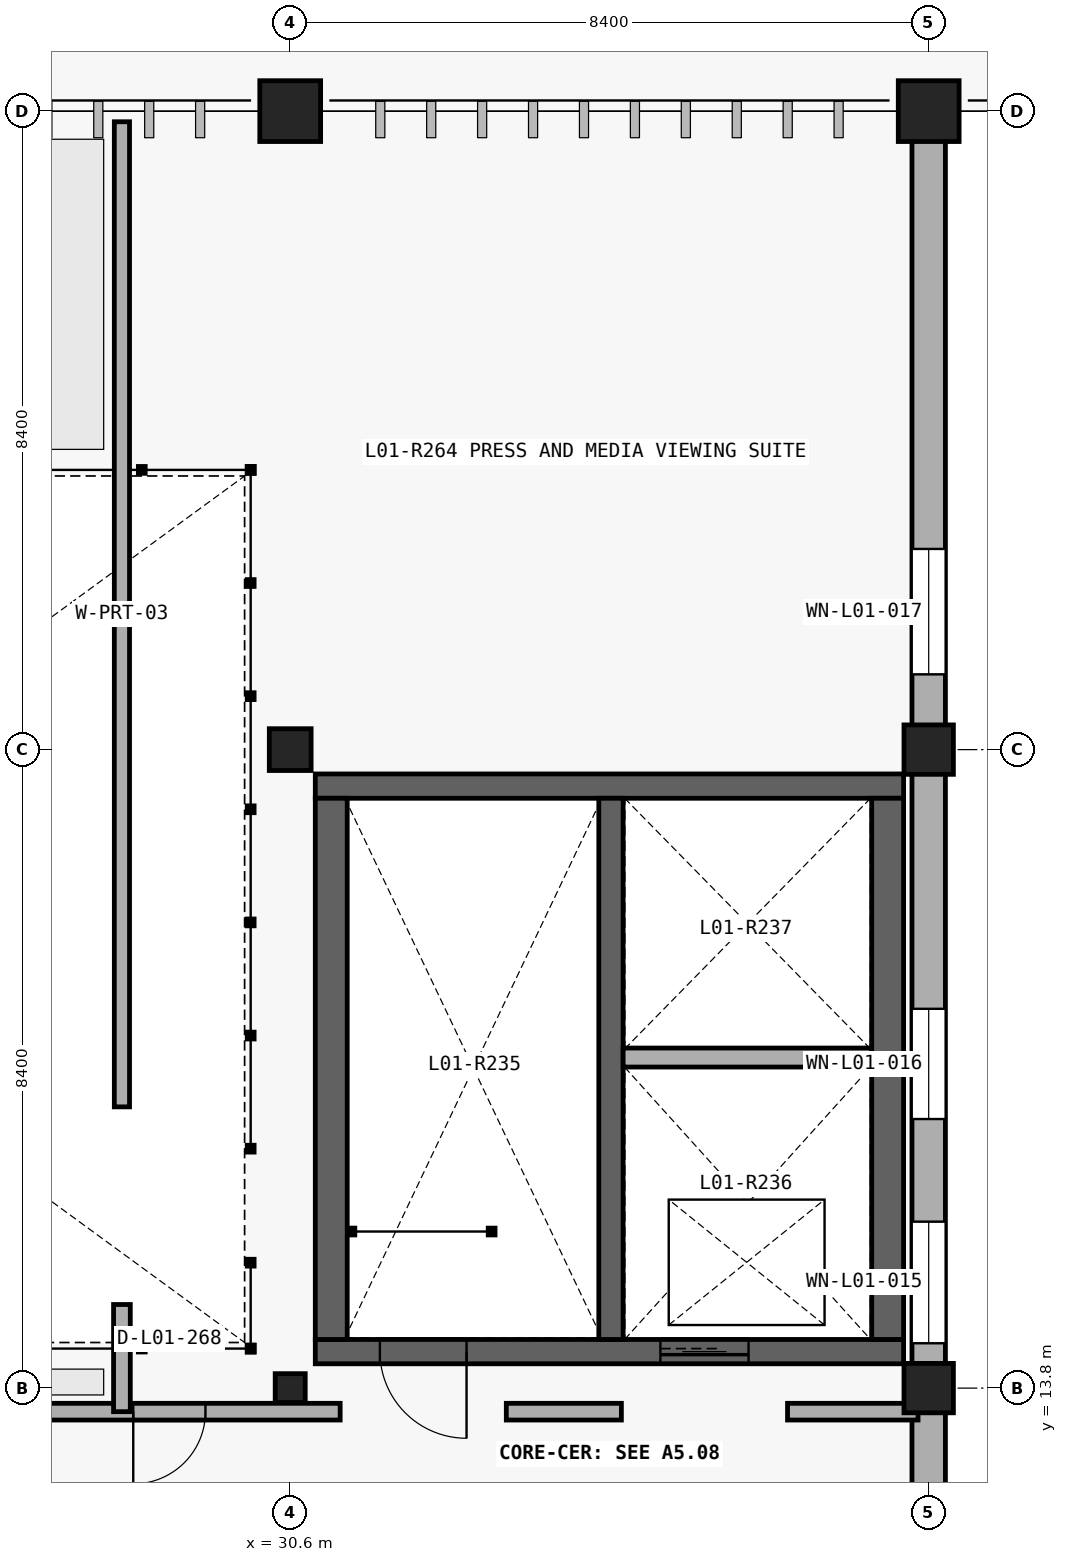
"""IFC4 building model, lengths in metres.
Left out: names, types, materials, properties, quantities, classifications, styles, units other than length and angle.
Written with IfcOpenShell. Run it as: python <this file> out.ifc"""

import sys

from ifc_helpers import new_model, si_unit, direction, frame, frame_2d, origin_with_axes, origin_2d_with_axis, place, context, subcontext, project, spatial, rectangle, circle, i_section, extrude, element, fill, save


model = new_model("IFC4")
c1 = context("Model", 3, precision=1e-05, world=origin_with_axes(), true_north=direction((0.0, 1.0)))
c2 = subcontext(c1, "Body", "Model", "MODEL_VIEW")
j1 = project(units=[si_unit("LENGTHUNIT", "METRE"), si_unit("PLANEANGLEUNIT", "RADIAN")], contexts=[c1])
p1 = place(None, origin_with_axes())
s1 = spatial("IfcSite", under=j1, at=p1, CompositionType="ELEMENT")
p2 = place(p1, origin_with_axes())
s2 = spatial("IfcBuilding", under=s1, at=p2, CompositionType="ELEMENT")
p3 = place(p2, frame((0.0, 0.0, 5.4), z_axis=(0.0, 0.0, 1.0), x_axis=(1.0, 0.0, 0.0)))
s3 = spatial("IfcBuildingStorey", under=s2, at=p3, CompositionType="ELEMENT", Elevation=5.4)
p4 = place(None, frame((39.0, 6.34, 5.4), z_axis=(0.0, 0.0, 1.0), x_axis=(0.0, 1.0, 0.0)))
e1 = element("IfcWall", 1, at=p4, inside=s3, PredefinedType="SOLIDWALL", context=c2, shape_type="SweptSolid", body=[
    extrude(rectangle(XDim=23.95, YDim=0.44, at=frame_2d((11.975, 0.0), x_axis=(1.0, 0.0))), origin_with_axes(), (0.0, 0.0, 1.0), 5.1),
])
p5 = place(None, frame((39.0, 9.015, 6.35), z_axis=(0.0, 0.0, 1.0), x_axis=(0.0, 1.0, 0.0)))
e2 = element("IfcOpeningElement", 2, at=p5, cuts=e1, PredefinedType="OPENING", context=c2, shape_type="SweptSolid", body=[
    extrude(rectangle(XDim=0.95, YDim=1.95, at=frame_2d((0.0, 0.975), x_axis=(1.0, 0.0))), frame((0.0, 0.23, 0.0), z_axis=(0.0, -1.0, 0.0), x_axis=(1.0, 0.0, 0.0)), (0.0, 0.0, 1.0), 0.46),
])
p6 = place(None, frame((39.0, 15.19, 6.25), z_axis=(0.0, 0.0, 1.0), x_axis=(0.0, 1.0, 0.0)))
e3 = element("IfcOpeningElement", 3, at=p6, cuts=e1, PredefinedType="OPENING", context=c2, shape_type="SweptSolid", body=[
    extrude(rectangle(XDim=1.6, YDim=3.1, at=frame_2d((0.0, 1.55), x_axis=(1.0, 0.0))), frame((0.0, 0.23, 0.0), z_axis=(0.0, -1.0, 0.0), x_axis=(1.0, 0.0, 0.0)), (0.0, 0.0, 1.0), 0.46),
])
p7 = place(None, frame((39.0, 18.065, 6.3), z_axis=(0.0, 0.0, 1.0), x_axis=(0.0, 1.0, 0.0)))
e4 = element("IfcOpeningElement", 4, at=p7, cuts=e1, PredefinedType="OPENING", context=c2, shape_type="SweptSolid", body=[
    extrude(rectangle(XDim=1.45, YDim=2.85, at=frame_2d((0.0, 1.425), x_axis=(1.0, 0.0))), frame((0.0, 0.23, 0.0), z_axis=(0.0, -1.0, 0.0), x_axis=(1.0, 0.0, 0.0)), (0.0, 0.0, 1.0), 0.46),
])
p8 = place(None, frame((39.0, 24.015, 6.3), z_axis=(0.0, 0.0, 1.0), x_axis=(0.0, 1.0, 0.0)))
e5 = element("IfcOpeningElement", 5, at=p8, cuts=e1, PredefinedType="OPENING", context=c2, shape_type="SweptSolid", body=[
    extrude(rectangle(XDim=1.65, YDim=2.4, at=frame_2d((0.0, 1.2), x_axis=(1.0, 0.0))), frame((0.0, 0.23, 0.0), z_axis=(0.0, -1.0, 0.0), x_axis=(1.0, 0.0, 0.0)), (0.0, 0.0, 1.0), 0.46),
])
p9 = place(None, frame((30.93, 14.28, 5.4), z_axis=(0.0, 0.0, 1.0), x_axis=(1.0, 0.0, 0.0)))
e6 = element("IfcWall", 6, at=p9, inside=s3, PredefinedType="SHEAR", context=c2, shape_type="SweptSolid", body=[
    extrude(rectangle(XDim=7.74, YDim=0.32, at=frame_2d((3.87, 0.0), x_axis=(1.0, 0.0))), origin_with_axes(), (0.0, 0.0, 1.0), 5.4),
])
p10 = place(None, frame((32.35, 14.28, 5.4), z_axis=(0.0, 0.0, 1.0), x_axis=(1.0, 0.0, 0.0)))
e7 = element("IfcOpeningElement", 7, at=p10, cuts=e6, PredefinedType="OPENING", context=c2, shape_type="SweptSolid", body=[
    extrude(rectangle(XDim=1.14, YDim=2.18, at=frame_2d((0.0, 1.09), x_axis=(1.0, 0.0))), frame((0.0, 0.17, 0.0), z_axis=(0.0, -1.0, 0.0), x_axis=(1.0, 0.0, 0.0)), (0.0, 0.0, 1.0), 0.34),
])
p11 = place(None, frame((36.05, 14.28, 5.4), z_axis=(0.0, 0.0, 1.0), x_axis=(1.0, 0.0, 0.0)))
e8 = element("IfcOpeningElement", 8, at=p11, cuts=e6, PredefinedType="OPENING", context=c2, shape_type="SweptSolid", body=[
    extrude(rectangle(XDim=1.16, YDim=2.2, at=frame_2d((0.0, 1.1), x_axis=(1.0, 0.0))), frame((0.0, 0.17, 0.0), z_axis=(0.0, -1.0, 0.0), x_axis=(1.0, 0.0, 0.0)), (0.0, 0.0, 1.0), 0.34),
])
p12 = place(None, frame((38.67, 21.72, 5.4), z_axis=(0.0, 0.0, 1.0), x_axis=(-1.0, 0.0, 0.0)))
e9 = element("IfcWall", 9, at=p12, inside=s3, PredefinedType="SHEAR", context=c2, shape_type="SweptSolid", body=[
    extrude(rectangle(XDim=7.74, YDim=0.32, at=frame_2d((3.87, 0.0), x_axis=(1.0, 0.0))), origin_with_axes(), (0.0, 0.0, 1.0), 5.4),
])
for number, where, z_axis, x_axis in (
    (10, (38.46, 14.44, 5.4), (0.0, 0.0, 1.0), (0.0, 1.0, 0.0)),
    (11, (31.14, 21.56, 5.4), (0.0, 0.0, 1.0), (0.0, -1.0, 0.0)),
):
    element("IfcWall", number, at=place(None, frame(where, z_axis=z_axis, x_axis=x_axis)), inside=s3, PredefinedType="SHEAR", context=c2, shape_type="SweptSolid", body=[
        extrude(rectangle(XDim=7.12, YDim=0.42, at=frame_2d((3.56, 0.0), x_axis=(1.0, 0.0))), origin_with_axes(), (0.0, 0.0, 1.0), 5.4),
    ])
p13 = place(None, frame((34.82, 14.44, 5.4), z_axis=(0.0, 0.0, 1.0), x_axis=(0.0, 1.0, 0.0)))
e12 = element("IfcWall", 12, at=p13, inside=s3, PredefinedType="SHEAR", context=c2, shape_type="SweptSolid", body=[
    extrude(rectangle(XDim=7.12, YDim=0.32, at=frame_2d((3.56, 0.0), x_axis=(1.0, 0.0))), origin_with_axes(), (0.0, 0.0, 1.0), 5.4),
])
p14 = place(None, frame((34.98, 18.149, 5.4), z_axis=(0.0, 0.0, 1.0), x_axis=(1.0, 0.0, 0.0)))
e13 = element("IfcWall", 13, at=p14, inside=s3, PredefinedType="PARTITIONING", context=c2, shape_type="SweptSolid", body=[
    extrude(rectangle(XDim=3.27, YDim=0.25, at=frame_2d((1.635, 0.0), x_axis=(1.0, 0.0))), origin_with_axes(), (0.0, 0.0, 1.0), 5.08),
])
p15 = place(None, frame((6.22, 13.49, 5.4), z_axis=(0.0, 0.0, 1.0), x_axis=(1.0, 0.0, 0.0)))
e14 = element("IfcWall", 14, at=p15, inside=s3, PredefinedType="PARTITIONING", context=c2, shape_type="SweptSolid", body=[
    extrude(rectangle(XDim=25.037, YDim=0.22, at=frame_2d((12.518, 0.0), x_axis=(1.0, 0.0))), origin_with_axes(), (0.0, 0.0, 1.0), 5.08),
])
p16 = place(None, frame((8.342, 13.49, 5.4), z_axis=(0.0, 0.0, 1.0), x_axis=(1.0, 0.0, 0.0)))
e15 = element("IfcOpeningElement", 15, at=p16, cuts=e14, PredefinedType="OPENING", context=c2, shape_type="SweptSolid", body=[
    extrude(rectangle(XDim=0.91, YDim=2.12, at=frame_2d((0.0, 1.06), x_axis=(1.0, 0.0))), frame((0.0, 0.12, 0.0), z_axis=(0.0, -1.0, 0.0), x_axis=(1.0, 0.0, 0.0)), (0.0, 0.0, 1.0), 0.24),
])
p17 = place(None, frame((18.963, 13.49, 5.4), z_axis=(0.0, 0.0, 1.0), x_axis=(1.0, 0.0, 0.0)))
e16 = element("IfcOpeningElement", 16, at=p17, cuts=e14, PredefinedType="OPENING", context=c2, shape_type="SweptSolid", body=[
    extrude(rectangle(XDim=1.56, YDim=2.28, at=frame_2d((0.0, 1.14), x_axis=(1.0, 0.0))), frame((0.0, 0.12, 0.0), z_axis=(0.0, -1.0, 0.0), x_axis=(1.0, 0.0, 0.0)), (0.0, 0.0, 1.0), 0.24),
])
p18 = place(None, frame((29.01, 13.49, 5.4), z_axis=(0.0, 0.0, 1.0), x_axis=(1.0, 0.0, 0.0)))
e17 = element("IfcOpeningElement", 17, at=p18, cuts=e14, PredefinedType="OPENING", context=c2, shape_type="SweptSolid", body=[
    extrude(rectangle(XDim=0.95, YDim=2.16, at=frame_2d((0.0, 1.08), x_axis=(1.0, 0.0))), frame((0.0, 0.12, 0.0), z_axis=(0.0, -1.0, 0.0), x_axis=(1.0, 0.0, 0.0)), (0.0, 0.0, 1.0), 0.24),
])
p19 = place(None, frame((23.833, 13.49, 6.45), z_axis=(0.0, 0.0, 1.0), x_axis=(1.0, 0.0, 0.0)))
e18 = element("IfcOpeningElement", 18, at=p19, cuts=e14, PredefinedType="OPENING", context=c2, shape_type="SweptSolid", body=[
    extrude(rectangle(XDim=1.9, YDim=1.5, at=frame_2d((0.0, 0.75), x_axis=(1.0, 0.0))), frame((0.0, 0.12, 0.0), z_axis=(0.0, -1.0, 0.0), x_axis=(1.0, 0.0, 0.0)), (0.0, 0.0, 1.0), 0.24),
])
p20 = place(None, frame((33.443, 13.49, 5.4), z_axis=(0.0, 0.0, 1.0), x_axis=(1.0, 0.0, 0.0)))
e19 = element("IfcWall", 19, at=p20, inside=s3, PredefinedType="PARTITIONING", context=c2, shape_type="SweptSolid", body=[
    extrude(rectangle(XDim=1.514, YDim=0.22, at=frame_2d((0.757, 0.0), x_axis=(1.0, 0.0))), origin_with_axes(), (0.0, 0.0, 1.0), 5.08),
])
p21 = place(None, frame((37.143, 13.49, 5.4), z_axis=(0.0, 0.0, 1.0), x_axis=(1.0, 0.0, 0.0)))
e20 = element("IfcWall", 20, at=p21, inside=s3, PredefinedType="PARTITIONING", context=c2, shape_type="SweptSolid", body=[
    extrude(rectangle(XDim=1.717, YDim=0.22, at=frame_2d((0.859, 0.0), x_axis=(1.0, 0.0))), origin_with_axes(), (0.0, 0.0, 1.0), 5.08),
])
p22 = place(None, frame((28.386, 13.49, 5.4), z_axis=(0.0, 0.0, 1.0), x_axis=(0.0, 1.0, 0.0)))
e21 = element("IfcWall", 21, at=p22, inside=s3, PredefinedType="PARTITIONING", context=c2, shape_type="SweptSolid", body=[
    extrude(rectangle(XDim=1.41, YDim=0.22, at=frame_2d((0.705, 0.0), x_axis=(1.0, 0.0))), origin_with_axes(), (0.0, 0.0, 1.0), 5.08),
])
p23 = place(None, frame((28.386, 17.5, 5.4), z_axis=(0.0, 0.0, 1.0), x_axis=(0.0, 1.0, 0.0)))
e22 = element("IfcWall", 22, at=p23, inside=s3, PredefinedType="PARTITIONING", context=c2, shape_type="SweptSolid", body=[
    extrude(rectangle(XDim=12.96, YDim=0.2, at=frame_2d((6.48, 0.0), x_axis=(1.0, 0.0))), origin_with_axes(), (0.0, 0.0, 1.0), 5.08),
])
p24 = place(None, frame((30.6, 13.8, 5.4), z_axis=(0.0, 0.0, 1.0), x_axis=(1.0, 0.0, 0.0)))
e23 = element("IfcColumn", 23, at=p24, inside=s3, PredefinedType="COLUMN", context=c2, shape_type="SweptSolid", body=[
    extrude(i_section(OverallWidth=0.395, OverallDepth=0.38, WebThickness=0.019, FlangeThickness=0.03, at=origin_2d_with_axis()), origin_with_axes(), (0.0, 0.0, 1.0), 5.4),
])
p25 = place(None, frame((30.6, 22.2, 5.4), z_axis=(0.0, 0.0, 1.0), x_axis=(1.0, 0.0, 0.0)))
e24 = element("IfcColumn", 24, at=p25, inside=s3, PredefinedType="COLUMN", context=c2, shape_type="SweptSolid", body=[
    extrude(i_section(OverallWidth=0.55, OverallDepth=0.55, WebThickness=0.025, FlangeThickness=0.042, at=origin_2d_with_axis()), origin_with_axes(), (0.0, 0.0, 1.0), 5.4),
])
p26 = place(None, frame((30.6, 30.6, 5.4), z_axis=(0.0, 0.0, 1.0), x_axis=(1.0, 0.0, 0.0)))
e25 = element("IfcColumn", 25, at=p26, inside=s3, PredefinedType="COLUMN", context=c2, shape_type="SweptSolid", body=[
    extrude(circle(Radius=0.4, at=origin_2d_with_axis()), origin_with_axes(), (0.0, 0.0, 1.0), 5.4),
])
for number, where, z_axis, x_axis in (
    (26, (39.0, 13.8, 5.4), (0.0, 0.0, 1.0), (1.0, 0.0, 0.0)),
    (27, (39.0, 22.2, 5.4), (0.0, 0.0, 1.0), (1.0, 0.0, 0.0)),
):
    element("IfcColumn", number, at=place(None, frame(where, z_axis=z_axis, x_axis=x_axis)), inside=s3, PredefinedType="COLUMN", context=c2, shape_type="SweptSolid", body=[
        extrude(circle(Radius=0.325, at=origin_2d_with_axis()), origin_with_axes(), (0.0, 0.0, 1.0), 5.4),
    ])
p27 = place(None, frame((39.0, 30.6, 5.4), z_axis=(0.0, 0.0, 1.0), x_axis=(1.0, 0.0, 0.0)))
e28 = element("IfcColumn", 28, at=p27, inside=s3, PredefinedType="COLUMN", context=c2, shape_type="SweptSolid", body=[
    extrude(circle(Radius=0.4, at=origin_2d_with_axis()), origin_with_axes(), (0.0, 0.0, 1.0), 5.4),
])
p28 = place(None, frame((32.35, 14.28, 5.4), z_axis=(0.0, 0.0, 1.0), x_axis=(-1.0, 0.0, 0.0)))
e29 = element("IfcDoor", 29, at=p28, inside=s3, OperationType="SINGLE_SWING_RIGHT", PredefinedType="DOOR", context=c2, shape_type="SweptSolid", body=[
    extrude(rectangle(XDim=1.14, YDim=2.18, at=frame_2d((0.0, 1.09), x_axis=(1.0, 0.0))), frame((0.0, 0.04, 0.0), z_axis=(0.0, -1.0, 0.0), x_axis=(1.0, 0.0, 0.0)), (0.0, 0.0, 1.0), 0.08),
])
fill(e7, e29)
p29 = place(None, frame((36.05, 14.28, 5.4), z_axis=(0.0, 0.0, 1.0), x_axis=(-1.0, 0.0, 0.0)))
e30 = element("IfcDoor", 30, at=p29, inside=s3, OperationType="SLIDING_TO_LEFT", PredefinedType="DOOR", context=c2, shape_type="SweptSolid", body=[
    extrude(rectangle(XDim=1.16, YDim=2.2, at=frame_2d((0.0, 1.1), x_axis=(1.0, 0.0))), frame((0.0, 0.04, 0.0), z_axis=(0.0, -1.0, 0.0), x_axis=(1.0, 0.0, 0.0)), (0.0, 0.0, 1.0), 0.08),
])
fill(e8, e30)
p30 = place(None, frame((29.01, 13.49, 5.4), z_axis=(0.0, 0.0, 1.0), x_axis=(-1.0, 0.0, 0.0)))
e31 = element("IfcDoor", 31, at=p30, inside=s3, OperationType="SINGLE_SWING_LEFT", PredefinedType="DOOR", context=c2, shape_type="SweptSolid", body=[
    extrude(rectangle(XDim=0.95, YDim=2.16, at=frame_2d((0.0, 1.08), x_axis=(1.0, 0.0))), frame((0.0, 0.04, 0.0), z_axis=(0.0, -1.0, 0.0), x_axis=(1.0, 0.0, 0.0)), (0.0, 0.0, 1.0), 0.08),
])
fill(e17, e31)
p31 = place(None, frame((39.0, 15.19, 6.25), z_axis=(0.0, 0.0, 1.0), x_axis=(0.0, 1.0, 0.0)))
e32 = element("IfcWindow", 32, at=p31, inside=s3, PartitioningType="SINGLE_PANEL", PredefinedType="WINDOW", context=c2, shape_type="SweptSolid", body=[
    extrude(rectangle(XDim=1.6, YDim=3.1, at=frame_2d((0.0, 1.55), x_axis=(1.0, 0.0))), frame((0.0, 0.03, 0.0), z_axis=(0.0, -1.0, 0.0), x_axis=(1.0, 0.0, 0.0)), (0.0, 0.0, 1.0), 0.06),
])
fill(e3, e32)
p32 = place(None, frame((39.0, 18.065, 6.3), z_axis=(0.0, 0.0, 1.0), x_axis=(0.0, 1.0, 0.0)))
e33 = element("IfcWindow", 33, at=p32, inside=s3, PartitioningType="SINGLE_PANEL", PredefinedType="WINDOW", context=c2, shape_type="SweptSolid", body=[
    extrude(rectangle(XDim=1.45, YDim=2.85, at=frame_2d((0.0, 1.425), x_axis=(1.0, 0.0))), frame((0.0, 0.03, 0.0), z_axis=(0.0, -1.0, 0.0), x_axis=(1.0, 0.0, 0.0)), (0.0, 0.0, 1.0), 0.06),
])
fill(e4, e33)
p33 = place(None, frame((39.0, 24.015, 6.3), z_axis=(0.0, 0.0, 1.0), x_axis=(0.0, 1.0, 0.0)))
e34 = element("IfcWindow", 34, at=p33, inside=s3, PartitioningType="SINGLE_PANEL", PredefinedType="WINDOW", context=c2, shape_type="SweptSolid", body=[
    extrude(rectangle(XDim=1.65, YDim=2.4, at=frame_2d((0.0, 1.2), x_axis=(1.0, 0.0))), frame((0.0, 0.03, 0.0), z_axis=(0.0, -1.0, 0.0), x_axis=(1.0, 0.0, 0.0)), (0.0, 0.0, 1.0), 0.06),
])
fill(e5, e34)
save(model, sys.argv[1])
